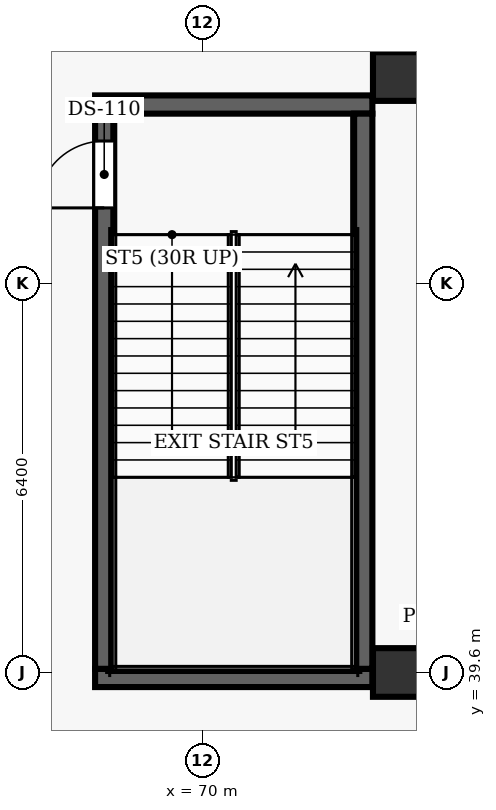
"""IFC4 building model, lengths in metres.
Left out: names, types, materials, properties, quantities, classifications, styles, units other than length and angle.
Written with IfcOpenShell. Run it as: python <this file> out.ifc"""

import sys

from ifc_helpers import new_model, si_unit, direction, frame, frame_2d, origin, origin_2d, place, context, subcontext, project, spatial, rectangle, extrude, element, fill, save


model = new_model("IFC4")
c1 = context("Model", 3, precision=1e-05, world=origin(), true_north=direction((0.0, 1.0)))
c2 = subcontext(c1, "Body", "Model", "MODEL_VIEW")
j1 = project(units=[si_unit("LENGTHUNIT", "METRE"), si_unit("PLANEANGLEUNIT", "RADIAN")], contexts=[c1])
p1 = place(None, origin())
s1 = spatial("IfcSite", under=j1, at=p1, CompositionType="ELEMENT")
p2 = place(p1, origin())
s2 = spatial("IfcBuilding", under=s1, at=p2, CompositionType="ELEMENT")
p3 = place(p2, frame((0.0, 0.0, 6.6)))
s3 = spatial("IfcBuildingStorey", under=s2, at=p3, CompositionType="ELEMENT", Elevation=6.6)
for number, where, z_axis, x_axis in (
    (1, (73.2, 39.6, 0.0), (0.0, 0.0, 1.0), (1.0, 0.0, 0.0)),
    (2, (73.2, 49.4, 0.0), (0.0, 0.0, 1.0), (1.0, 0.0, 0.0)),
):
    element("IfcColumn", number, at=place(p3, frame(where, z_axis=z_axis, x_axis=x_axis)), inside=s3, PredefinedType="COLUMN", context=c2, shape_type="SweptSolid", body=[
        extrude(rectangle(XDim=0.8, YDim=0.8, at=origin_2d()), origin(), (0.0, 0.0, 1.0), 5.4),
    ])
for number, where, z_axis, x_axis in (
    (3, (68.23, 39.51, 0.0), (0.0, 0.0, 1.0), (1.0, 0.0, 0.0)),
    (4, (68.23, 48.94, 0.0), (0.0, 0.0, 1.0), (1.0, 0.0, 0.0)),
):
    element("IfcWall", number, at=place(p3, frame(where, z_axis=z_axis, x_axis=x_axis)), inside=s3, PredefinedType="SHEAR", context=c2, shape_type="SweptSolid", body=[
        extrude(rectangle(XDim=4.56, YDim=0.3, at=frame_2d((2.28, 0.0))), origin(), (0.0, 0.0, 1.0), 5.4),
    ])
p4 = place(p3, frame((68.38, 39.66, 0.0), z_axis=(0.0, 0.0, 1.0), x_axis=(0.0, 1.0, 0.0)))
e5 = element("IfcWall", 5, at=p4, inside=s3, PredefinedType="SHEAR", context=c2, shape_type="SweptSolid", body=[
    extrude(rectangle(XDim=9.13, YDim=0.3, at=frame_2d((4.565, 0.0))), origin(), (0.0, 0.0, 1.0), 5.4),
])
p5 = place(p4, frame((7.58, 0.0, 0.0)))
e6 = element("IfcOpeningElement", 6, at=p5, cuts=e5, PredefinedType="OPENING", context=c2, shape_type="SweptSolid", body=[
    extrude(rectangle(XDim=1.1, YDim=2.15, at=frame_2d((0.55, 1.075))), frame((0.0, 0.16, 0.0), z_axis=(0.0, -1.0, 0.0), x_axis=(1.0, 0.0, 0.0)), (0.0, 0.0, 1.0), 0.32),
])
p6 = place(p3, frame((72.64, 48.79, 0.0), z_axis=(0.0, 0.0, 1.0), x_axis=(0.0, -1.0, 0.0)))
e7 = element("IfcWall", 7, at=p6, inside=s3, PredefinedType="SHEAR", context=c2, shape_type="SweptSolid", body=[
    extrude(rectangle(XDim=9.13, YDim=0.3, at=frame_2d((4.565, 0.0))), origin(), (0.0, 0.0, 1.0), 5.4),
])
p7 = place(p5, origin())
e8 = element("IfcDoor", 8, at=p7, inside=s3, OperationType="SINGLE_SWING_LEFT", PredefinedType="DOOR", context=c2, shape_type="SweptSolid", body=[
    extrude(rectangle(XDim=1.1, YDim=2.15, at=frame_2d((0.55, 1.075))), frame((0.0, 0.025, 0.0), z_axis=(0.0, -1.0, 0.0), x_axis=(1.0, 0.0, 0.0)), (0.0, 0.0, 1.0), 0.05),
])
fill(e6, e8)
save(model, sys.argv[1])
